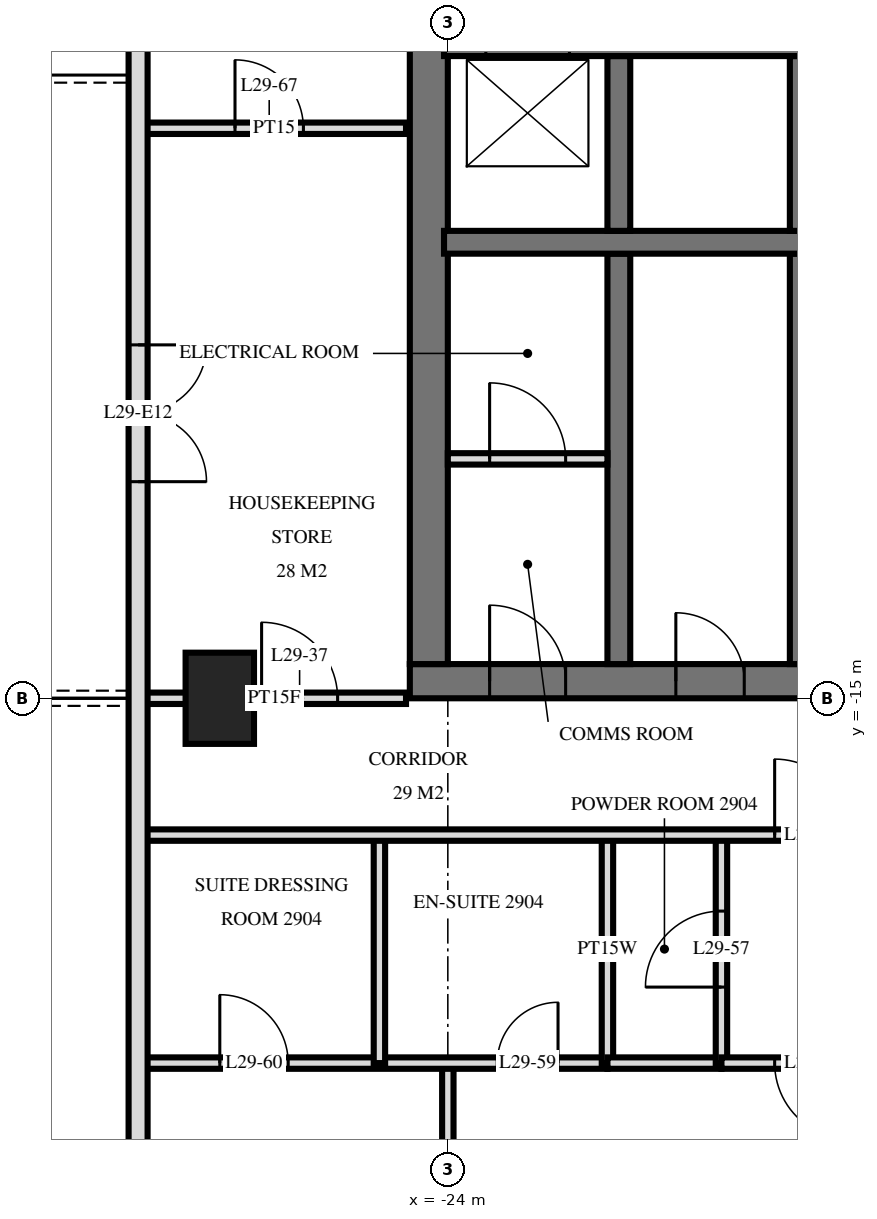
"""IFC4 building model, lengths in metres.
Left out: names, types, materials, properties, quantities, classifications, styles, units other than length and angle.
Written with IfcOpenShell. Run it as: python <this file> out.ifc"""

import sys

from ifc_helpers import new_model, si_unit, direction, frame, frame_2d, origin, origin_2d, place, context, subcontext, project, spatial, rectangle, extrude, element, fill, save


model = new_model("IFC4")
c1 = context("Model", 3, precision=1e-05, world=origin(), true_north=direction((0.0, 1.0)))
c2 = subcontext(c1, "Body", "Model", "MODEL_VIEW")
j1 = project(units=[si_unit("LENGTHUNIT", "METRE"), si_unit("PLANEANGLEUNIT", "RADIAN")], contexts=[c1])
p1 = place(None, origin())
s1 = spatial("IfcSite", under=j1, at=p1, CompositionType="ELEMENT")
p2 = place(p1, origin())
s2 = spatial("IfcBuilding", under=s1, at=p2, CompositionType="ELEMENT")
p3 = place(p2, frame((0.0, 0.0, 116.4)))
s3 = spatial("IfcBuildingStorey", under=s2, at=p3, CompositionType="ELEMENT", Elevation=116.4)
p4 = place(p3, frame((-27.0, -15.0, 0.0), z_axis=(0.0, 0.0, 1.0), x_axis=(0.0, 1.0, 0.0)))
e1 = element("IfcColumn", 1, at=p4, inside=s3, PredefinedType="COLUMN", context=c2, shape_type="SweptSolid", body=[
    extrude(rectangle(XDim=1.2, YDim=0.9, at=origin_2d()), origin(), (0.0, 0.0, 1.0), 3.6),
])
p5 = place(p3, frame((-24.5, -14.775, 0.0), z_axis=(0.0, 0.0, 1.0), x_axis=(1.0, 0.0, 0.0)))
e2 = element("IfcWall", 2, at=p5, inside=s3, PredefinedType="SHEAR", context=c2, shape_type="SweptSolid", body=[
    extrude(rectangle(XDim=14.5, YDim=0.45, at=frame_2d((7.25, 0.0))), origin(), (0.0, 0.0, 1.0), 3.6),
])
p6 = place(p5, frame((6.2, 0.0, 0.0)))
e3 = element("IfcOpeningElement", 3, at=p6, cuts=e2, PredefinedType="OPENING", context=c2, shape_type="SweptSolid", body=[
    extrude(rectangle(XDim=1.2, YDim=2.1, at=frame_2d((0.6, 1.05))), frame((0.0, 0.235, 0.0), z_axis=(0.0, -1.0, 0.0), x_axis=(1.0, 0.0, 0.0)), (0.0, 0.0, 1.0), 0.47),
])
p7 = place(p5, frame((9.25, 0.0, 0.0)))
e4 = element("IfcOpeningElement", 4, at=p7, cuts=e2, PredefinedType="OPENING", context=c2, shape_type="SweptSolid", body=[
    extrude(rectangle(XDim=1.1, YDim=2.1, at=frame_2d((0.55, 1.05))), frame((0.0, 0.235, 0.0), z_axis=(0.0, -1.0, 0.0), x_axis=(1.0, 0.0, 0.0)), (0.0, 0.0, 1.0), 0.47),
])
p8 = place(p5, frame((3.5, 0.0, 0.0)))
e5 = element("IfcOpeningElement", 5, at=p8, cuts=e2, PredefinedType="OPENING", context=c2, shape_type="SweptSolid", body=[
    extrude(rectangle(XDim=0.9, YDim=2.1, at=frame_2d((0.45, 1.05))), frame((0.0, 0.235, 0.0), z_axis=(0.0, -1.0, 0.0), x_axis=(1.0, 0.0, 0.0)), (0.0, 0.0, 1.0), 0.47),
])
p9 = place(p5, frame((1.05, 0.0, 0.0)))
e6 = element("IfcOpeningElement", 6, at=p9, cuts=e2, PredefinedType="OPENING", context=c2, shape_type="SweptSolid", body=[
    extrude(rectangle(XDim=1.0, YDim=2.1, at=frame_2d((0.5, 1.05))), frame((0.0, 0.235, 0.0), z_axis=(0.0, -1.0, 0.0), x_axis=(1.0, 0.0, 0.0)), (0.0, 0.0, 1.0), 0.47),
])
p10 = place(p3, frame((-24.25, -14.55, 0.0), z_axis=(0.0, 0.0, 1.0), x_axis=(0.0, 1.0, 0.0)))
e7 = element("IfcWall", 7, at=p10, inside=s3, PredefinedType="SHEAR", context=c2, shape_type="SweptSolid", body=[
    extrude(rectangle(XDim=14.1, YDim=0.5, at=frame_2d((7.05, 0.0))), origin(), (0.0, 0.0, 1.0), 3.6),
])
p11 = place(p3, frame((-24.05, -6.4, 0.0), z_axis=(0.0, 0.0, 1.0), x_axis=(1.0, 0.0, 0.0)))
e8 = element("IfcWall", 8, at=p11, inside=s3, PredefinedType="SHEAR", context=c2, shape_type="SweptSolid", body=[
    extrude(rectangle(XDim=13.7, YDim=0.3, at=frame_2d((6.85, 0.0))), origin(), (0.0, 0.0, 1.0), 3.6),
])
p12 = place(p11, frame((0.55, 0.0, 0.0)))
e9 = element("IfcOpeningElement", 9, at=p12, cuts=e8, PredefinedType="OPENING", context=c2, shape_type="SweptSolid", body=[
    extrude(rectangle(XDim=1.1, YDim=2.1, at=frame_2d((0.55, 1.05))), frame((0.0, 0.16, 0.0), z_axis=(0.0, -1.0, 0.0), x_axis=(1.0, 0.0, 0.0)), (0.0, 0.0, 1.0), 0.32),
])
p13 = place(p11, frame((5.8, 0.0, 0.0)))
e10 = element("IfcOpeningElement", 10, at=p13, cuts=e8, PredefinedType="OPENING", context=c2, shape_type="SweptSolid", body=[
    extrude(rectangle(XDim=1.1, YDim=2.1, at=frame_2d((0.55, 1.05))), frame((0.0, 0.16, 0.0), z_axis=(0.0, -1.0, 0.0), x_axis=(1.0, 0.0, 0.0)), (0.0, 0.0, 1.0), 0.32),
])
p14 = place(p3, frame((-24.05, -9.0, 0.0), z_axis=(0.0, 0.0, 1.0), x_axis=(1.0, 0.0, 0.0)))
e11 = element("IfcWall", 11, at=p14, inside=s3, PredefinedType="SHEAR", context=c2, shape_type="SweptSolid", body=[
    extrude(rectangle(XDim=13.7, YDim=0.3, at=frame_2d((6.85, 0.0))), origin(), (0.0, 0.0, 1.0), 3.6),
])
p15 = place(p14, frame((8.8, 0.0, 0.0)))
e12 = element("IfcOpeningElement", 12, at=p15, cuts=e11, PredefinedType="OPENING", context=c2, shape_type="SweptSolid", body=[
    extrude(rectangle(XDim=1.1, YDim=2.1, at=frame_2d((0.55, 1.05))), frame((0.0, 0.16, 0.0), z_axis=(0.0, -1.0, 0.0), x_axis=(1.0, 0.0, 0.0)), (0.0, 0.0, 1.0), 0.32),
])
p16 = place(p3, frame((-19.275, -8.85, 0.0), z_axis=(0.0, 0.0, 1.0), x_axis=(0.0, 1.0, 0.0)))
e13 = element("IfcWall", 13, at=p16, inside=s3, PredefinedType="SHEAR", context=c2, shape_type="SweptSolid", body=[
    extrude(rectangle(XDim=2.3, YDim=0.45, at=frame_2d((1.15, 0.0))), origin(), (0.0, 0.0, 1.0), 3.6),
])
p17 = place(p3, frame((-19.275, -14.55, 0.0), z_axis=(0.0, 0.0, 1.0), x_axis=(0.0, 1.0, 0.0)))
e14 = element("IfcWall", 14, at=p17, inside=s3, PredefinedType="SHEAR", context=c2, shape_type="SweptSolid", body=[
    extrude(rectangle(XDim=5.4, YDim=0.45, at=frame_2d((2.7, 0.0))), origin(), (0.0, 0.0, 1.0), 3.6),
])
p18 = place(p3, frame((-21.75, -8.85, 0.0), z_axis=(0.0, 0.0, 1.0), x_axis=(0.0, 1.0, 0.0)))
e15 = element("IfcWall", 15, at=p18, inside=s3, PredefinedType="SHEAR", context=c2, shape_type="SweptSolid", body=[
    extrude(rectangle(XDim=2.3, YDim=0.3, at=frame_2d((1.15, 0.0))), origin(), (0.0, 0.0, 1.0), 3.6),
])
p19 = place(p3, frame((-21.75, -14.55, 0.0), z_axis=(0.0, 0.0, 1.0), x_axis=(0.0, 1.0, 0.0)))
e16 = element("IfcWall", 16, at=p19, inside=s3, PredefinedType="SHEAR", context=c2, shape_type="SweptSolid", body=[
    extrude(rectangle(XDim=5.4, YDim=0.3, at=frame_2d((2.7, 0.0))), origin(), (0.0, 0.0, 1.0), 3.6),
])
p20 = place(p3, frame((-28.075, -3.325, 0.0), z_axis=(0.0, 0.0, 1.0), x_axis=(0.0, -1.0, 0.0)))
e17 = element("IfcWall", 17, at=p20, inside=s3, PredefinedType="SOLIDWALL", context=c2, shape_type="SweptSolid", body=[
    extrude(rectangle(XDim=25.951, YDim=0.25, at=frame_2d((12.975, 0.0))), origin(), (0.0, 0.0, 1.0), 3.32),
])
p21 = place(p20, frame((7.025, 0.0, 0.0)))
e18 = element("IfcOpeningElement", 18, at=p21, cuts=e17, PredefinedType="OPENING", context=c2, shape_type="SweptSolid", body=[
    extrude(rectangle(XDim=1.8, YDim=2.4, at=frame_2d((0.9, 1.2))), frame((0.0, 0.135, 0.0), z_axis=(0.0, -1.0, 0.0), x_axis=(1.0, 0.0, 0.0)), (0.0, 0.0, 1.0), 0.27),
])
p22 = place(p20, frame((18.175, 0.0, 0.0)))
e19 = element("IfcOpeningElement", 19, at=p22, cuts=e17, PredefinedType="OPENING", context=c2, shape_type="SweptSolid", body=[
    extrude(rectangle(XDim=1.8, YDim=2.4, at=frame_2d((0.9, 1.2))), frame((0.0, 0.135, 0.0), z_axis=(0.0, -1.0, 0.0), x_axis=(1.0, 0.0, 0.0)), (0.0, 0.0, 1.0), 0.27),
])
p23 = place(p20, frame((21.075, 0.0, 0.0)))
e20 = element("IfcOpeningElement", 20, at=p23, cuts=e17, PredefinedType="OPENING", context=c2, shape_type="SweptSolid", body=[
    extrude(rectangle(XDim=1.8, YDim=2.4, at=frame_2d((0.9, 1.2))), frame((0.0, 0.135, 0.0), z_axis=(0.0, -1.0, 0.0), x_axis=(1.0, 0.0, 0.0)), (0.0, 0.0, 1.0), 0.27),
])
p24 = place(p20, frame((23.825, 0.0, 0.3)))
e21 = element("IfcOpeningElement", 21, at=p24, cuts=e17, PredefinedType="OPENING", context=c2, shape_type="SweptSolid", body=[
    extrude(rectangle(XDim=1.8, YDim=2.1, at=frame_2d((0.9, 1.05))), frame((0.0, 0.135, 0.0), z_axis=(0.0, -1.0, 0.0), x_axis=(1.0, 0.0, 0.0)), (0.0, 0.0, 1.0), 0.27),
])
p25 = place(p3, frame((-24.0, -11.85, 0.0), z_axis=(0.0, 0.0, 1.0), x_axis=(1.0, 0.0, 0.0)))
e22 = element("IfcWall", 22, at=p25, inside=s3, PredefinedType="PARTITIONING", context=c2, shape_type="SweptSolid", body=[
    extrude(rectangle(XDim=2.1, YDim=0.15, at=frame_2d((1.05, 0.0))), origin(), (0.0, 0.0, 1.0), 3.3),
])
p26 = place(p25, frame((0.55, 0.0, 0.0)))
e23 = element("IfcOpeningElement", 23, at=p26, cuts=e22, PredefinedType="OPENING", context=c2, shape_type="SweptSolid", body=[
    extrude(rectangle(XDim=1.0, YDim=2.1, at=frame_2d((0.5, 1.05))), frame((0.0, 0.085, 0.0), z_axis=(0.0, -1.0, 0.0), x_axis=(1.0, 0.0, 0.0)), (0.0, 0.0, 1.0), 0.17),
])
p27 = place(p3, frame((-20.4, -19.8, 0.0), z_axis=(0.0, 0.0, 1.0), x_axis=(0.0, 1.0, 0.0)))
e24 = element("IfcWall", 24, at=p27, inside=s3, PredefinedType="PARTITIONING", context=c2, shape_type="SweptSolid", body=[
    extrude(rectangle(XDim=3.0, YDim=0.15, at=frame_2d((1.5, 0.0))), origin(), (0.0, 0.0, 1.0), 3.32),
])
p28 = place(p27, frame((1.0, 0.0, 0.0)))
e25 = element("IfcOpeningElement", 25, at=p28, cuts=e24, PredefinedType="OPENING", context=c2, shape_type="SweptSolid", body=[
    extrude(rectangle(XDim=1.0, YDim=2.1, at=frame_2d((0.5, 1.05))), frame((0.0, 0.085, 0.0), z_axis=(0.0, -1.0, 0.0), x_axis=(1.0, 0.0, 0.0)), (0.0, 0.0, 1.0), 0.17),
])
p29 = place(p3, frame((-21.9, -19.8, 0.0), z_axis=(0.0, 0.0, 1.0), x_axis=(0.0, 1.0, 0.0)))
e26 = element("IfcWall", 26, at=p29, inside=s3, PredefinedType="PLUMBINGWALL", context=c2, shape_type="SweptSolid", body=[
    extrude(rectangle(XDim=3.0, YDim=0.15, at=frame_2d((1.5, 0.0))), origin(), (0.0, 0.0, 1.0), 3.32),
])
p30 = place(p3, frame((-24.0, -33.557, 0.0), z_axis=(0.0, 0.0, 1.0), x_axis=(0.0, 1.0, 0.0)))
e27 = element("IfcWall", 27, at=p30, inside=s3, PredefinedType="PARTITIONING", context=c2, shape_type="SweptSolid", body=[
    extrude(rectangle(XDim=13.757, YDim=0.15, at=frame_2d((6.878, 0.0))), origin(), (0.0, 0.0, 1.0), 3.32),
])
p31 = place(p30, frame((6.337, 0.0, 0.0)))
e28 = element("IfcOpeningElement", 28, at=p31, cuts=e27, PredefinedType="OPENING", context=c2, shape_type="SweptSolid", body=[
    extrude(rectangle(XDim=0.9, YDim=2.1, at=frame_2d((0.45, 1.05))), frame((0.0, 0.085, 0.0), z_axis=(0.0, -1.0, 0.0), x_axis=(1.0, 0.0, 0.0)), (0.0, 0.0, 1.0), 0.17),
])
p32 = place(p3, frame((-24.9, -19.8, 0.0), z_axis=(0.0, 0.0, 1.0), x_axis=(0.0, 1.0, 0.0)))
e29 = element("IfcWall", 29, at=p32, inside=s3, PredefinedType="PARTITIONING", context=c2, shape_type="SweptSolid", body=[
    extrude(rectangle(XDim=3.0, YDim=0.15, at=frame_2d((1.5, 0.0))), origin(), (0.0, 0.0, 1.0), 3.32),
])
p33 = place(p3, frame((-20.4, -19.8, 0.0), z_axis=(0.0, 0.0, 1.0), x_axis=(1.0, 0.0, 0.0)))
e30 = element("IfcWall", 30, at=p33, inside=s3, PredefinedType="PARTITIONING", context=c2, shape_type="SweptSolid", body=[
    extrude(rectangle(XDim=2.4, YDim=0.15, at=frame_2d((1.2, 0.0))), origin(), (0.0, 0.0, 1.0), 3.32),
])
p34 = place(p33, frame((0.7, 0.0, 0.0)))
e31 = element("IfcOpeningElement", 31, at=p34, cuts=e30, PredefinedType="OPENING", context=c2, shape_type="SweptSolid", body=[
    extrude(rectangle(XDim=1.0, YDim=2.1, at=frame_2d((0.5, 1.05))), frame((0.0, 0.085, 0.0), z_axis=(0.0, -1.0, 0.0), x_axis=(1.0, 0.0, 0.0)), (0.0, 0.0, 1.0), 0.17),
])
p35 = place(p3, frame((-28.02, -19.8, 0.0), z_axis=(0.0, 0.0, 1.0), x_axis=(1.0, 0.0, 0.0)))
e32 = element("IfcWall", 32, at=p35, inside=s3, PredefinedType="PARTITIONING", context=c2, shape_type="SweptSolid", body=[
    extrude(rectangle(XDim=6.12, YDim=0.15, at=frame_2d((3.06, 0.0))), origin(), (0.0, 0.0, 1.0), 3.32),
])
p36 = place(p35, frame((4.67, 0.0, 0.0)))
e33 = element("IfcOpeningElement", 33, at=p36, cuts=e32, PredefinedType="OPENING", context=c2, shape_type="SweptSolid", body=[
    extrude(rectangle(XDim=0.8, YDim=2.1, at=frame_2d((0.4, 1.05))), frame((0.0, 0.085, 0.0), z_axis=(0.0, -1.0, 0.0), x_axis=(1.0, 0.0, 0.0)), (0.0, 0.0, 1.0), 0.17),
])
p37 = place(p35, frame((1.02, 0.0, 0.0)))
e34 = element("IfcOpeningElement", 34, at=p37, cuts=e32, PredefinedType="OPENING", context=c2, shape_type="SweptSolid", body=[
    extrude(rectangle(XDim=0.9, YDim=2.1, at=frame_2d((0.45, 1.05))), frame((0.0, 0.085, 0.0), z_axis=(0.0, -1.0, 0.0), x_axis=(1.0, 0.0, 0.0)), (0.0, 0.0, 1.0), 0.17),
])
p38 = place(p3, frame((-21.9, -19.8, 0.0), z_axis=(0.0, 0.0, 1.0), x_axis=(1.0, 0.0, 0.0)))
e35 = element("IfcWall", 35, at=p38, inside=s3, PredefinedType="PLUMBINGWALL", context=c2, shape_type="SweptSolid", body=[
    extrude(rectangle(XDim=1.5, YDim=0.15, at=frame_2d((0.75, 0.0))), origin(), (0.0, 0.0, 1.0), 3.32),
])
p39 = place(p3, frame((-28.02, -16.8, 0.0), z_axis=(0.0, 0.0, 1.0), x_axis=(1.0, 0.0, 0.0)))
e36 = element("IfcWall", 36, at=p39, inside=s3, PredefinedType="PARTITIONING", context=c2, shape_type="SweptSolid", body=[
    extrude(rectangle(XDim=56.04, YDim=0.15, at=frame_2d((28.02, 0.0))), origin(), (0.0, 0.0, 1.0), 3.32),
])
p40 = place(p39, frame((13.17, 0.0, 0.0)))
e37 = element("IfcOpeningElement", 37, at=p40, cuts=e36, PredefinedType="OPENING", context=c2, shape_type="SweptSolid", body=[
    extrude(rectangle(XDim=1.0, YDim=2.1, at=frame_2d((0.5, 1.05))), frame((0.0, 0.085, 0.0), z_axis=(0.0, -1.0, 0.0), x_axis=(1.0, 0.0, 0.0)), (0.0, 0.0, 1.0), 0.17),
])
p41 = place(p39, frame((11.87, 0.0, 0.0)))
e38 = element("IfcOpeningElement", 38, at=p41, cuts=e36, PredefinedType="OPENING", context=c2, shape_type="SweptSolid", body=[
    extrude(rectangle(XDim=1.0, YDim=2.1, at=frame_2d((0.5, 1.05))), frame((0.0, 0.085, 0.0), z_axis=(0.0, -1.0, 0.0), x_axis=(1.0, 0.0, 0.0)), (0.0, 0.0, 1.0), 0.17),
])
p42 = place(p39, frame((8.32, 0.0, 0.0)))
e39 = element("IfcOpeningElement", 39, at=p42, cuts=e36, PredefinedType="OPENING", context=c2, shape_type="SweptSolid", body=[
    extrude(rectangle(XDim=1.0, YDim=2.1, at=frame_2d((0.5, 1.05))), frame((0.0, 0.085, 0.0), z_axis=(0.0, -1.0, 0.0), x_axis=(1.0, 0.0, 0.0)), (0.0, 0.0, 1.0), 0.17),
])
p43 = place(p39, frame((40.42, 0.0, 0.0)))
e40 = element("IfcOpeningElement", 40, at=p43, cuts=e36, PredefinedType="OPENING", context=c2, shape_type="SweptSolid", body=[
    extrude(rectangle(XDim=1.0, YDim=2.1, at=frame_2d((0.5, 1.05))), frame((0.0, 0.085, 0.0), z_axis=(0.0, -1.0, 0.0), x_axis=(1.0, 0.0, 0.0)), (0.0, 0.0, 1.0), 0.17),
])
p44 = place(p39, frame((46.72, 0.0, 0.0)))
e41 = element("IfcOpeningElement", 41, at=p44, cuts=e36, PredefinedType="OPENING", context=c2, shape_type="SweptSolid", body=[
    extrude(rectangle(XDim=1.0, YDim=2.1, at=frame_2d((0.5, 1.05))), frame((0.0, 0.085, 0.0), z_axis=(0.0, -1.0, 0.0), x_axis=(1.0, 0.0, 0.0)), (0.0, 0.0, 1.0), 0.17),
])
p45 = place(p39, frame((21.52, 0.0, 0.0)))
e42 = element("IfcOpeningElement", 42, at=p45, cuts=e36, PredefinedType="OPENING", context=c2, shape_type="SweptSolid", body=[
    extrude(rectangle(XDim=1.0, YDim=2.1, at=frame_2d((0.5, 1.05))), frame((0.0, 0.085, 0.0), z_axis=(0.0, -1.0, 0.0), x_axis=(1.0, 0.0, 0.0)), (0.0, 0.0, 1.0), 0.17),
])
p46 = place(p39, frame((30.52, 0.0, 0.0)))
e43 = element("IfcOpeningElement", 43, at=p46, cuts=e36, PredefinedType="OPENING", context=c2, shape_type="SweptSolid", body=[
    extrude(rectangle(XDim=1.0, YDim=2.1, at=frame_2d((0.5, 1.05))), frame((0.0, 0.085, 0.0), z_axis=(0.0, -1.0, 0.0), x_axis=(1.0, 0.0, 0.0)), (0.0, 0.0, 1.0), 0.17),
])
p47 = place(p39, frame((36.52, 0.0, 0.0)))
e44 = element("IfcOpeningElement", 44, at=p47, cuts=e36, PredefinedType="OPENING", context=c2, shape_type="SweptSolid", body=[
    extrude(rectangle(XDim=1.0, YDim=2.1, at=frame_2d((0.5, 1.05))), frame((0.0, 0.085, 0.0), z_axis=(0.0, -1.0, 0.0), x_axis=(1.0, 0.0, 0.0)), (0.0, 0.0, 1.0), 0.17),
])
p48 = place(p3, frame((-28.02, -15.0, 0.0), z_axis=(0.0, 0.0, 1.0), x_axis=(1.0, 0.0, 0.0)))
e45 = element("IfcWall", 45, at=p48, inside=s3, PredefinedType="PARTITIONING", context=c2, shape_type="SweptSolid", body=[
    extrude(rectangle(XDim=3.47, YDim=0.15, at=frame_2d((1.735, 0.0))), origin(), (0.0, 0.0, 1.0), 3.32),
])
p49 = place(p48, frame((1.57, 0.0, 0.0)))
e46 = element("IfcOpeningElement", 46, at=p49, cuts=e45, PredefinedType="OPENING", context=c2, shape_type="SweptSolid", body=[
    extrude(rectangle(XDim=1.0, YDim=2.1, at=frame_2d((0.5, 1.05))), frame((0.0, 0.085, 0.0), z_axis=(0.0, -1.0, 0.0), x_axis=(1.0, 0.0, 0.0)), (0.0, 0.0, 1.0), 0.17),
])
p50 = place(p3, frame((-28.02, -7.5, 0.0), z_axis=(0.0, 0.0, 1.0), x_axis=(1.0, 0.0, 0.0)))
e47 = element("IfcWall", 47, at=p50, inside=s3, PredefinedType="PARTITIONING", context=c2, shape_type="SweptSolid", body=[
    extrude(rectangle(XDim=3.47, YDim=0.15, at=frame_2d((1.735, 0.0))), origin(), (0.0, 0.0, 1.0), 3.32),
])
p51 = place(p50, frame((1.22, 0.0, 0.0)))
e48 = element("IfcOpeningElement", 48, at=p51, cuts=e47, PredefinedType="OPENING", context=c2, shape_type="SweptSolid", body=[
    extrude(rectangle(XDim=0.9, YDim=2.1, at=frame_2d((0.45, 1.05))), frame((0.0, 0.085, 0.0), z_axis=(0.0, -1.0, 0.0), x_axis=(1.0, 0.0, 0.0)), (0.0, 0.0, 1.0), 0.17),
])
p52 = place(p21, origin())
e49 = element("IfcDoor", 49, at=p52, inside=s3, OperationType="DOUBLE_DOOR_SINGLE_SWING", PredefinedType="DOOR", context=c2, shape_type="SweptSolid", body=[
    extrude(rectangle(XDim=1.8, YDim=2.4, at=frame_2d((0.9, 1.2))), frame((0.0, 0.025, 0.0), z_axis=(0.0, -1.0, 0.0), x_axis=(1.0, 0.0, 0.0)), (0.0, 0.0, 1.0), 0.05),
])
fill(e18, e49)
p53 = place(p8, origin())
e50 = element("IfcDoor", 50, at=p53, inside=s3, OperationType="SINGLE_SWING_RIGHT", PredefinedType="DOOR", context=c2, shape_type="SweptSolid", body=[
    extrude(rectangle(XDim=0.9, YDim=2.1, at=frame_2d((0.45, 1.05))), frame((0.0, 0.025, 0.0), z_axis=(0.0, -1.0, 0.0), x_axis=(1.0, 0.0, 0.0)), (0.0, 0.0, 1.0), 0.05),
])
fill(e5, e50)
p54 = place(p9, origin())
e51 = element("IfcDoor", 51, at=p54, inside=s3, OperationType="SINGLE_SWING_RIGHT", PredefinedType="DOOR", context=c2, shape_type="SweptSolid", body=[
    extrude(rectangle(XDim=1.0, YDim=2.1, at=frame_2d((0.5, 1.05))), frame((0.0, 0.025, 0.0), z_axis=(0.0, -1.0, 0.0), x_axis=(1.0, 0.0, 0.0)), (0.0, 0.0, 1.0), 0.05),
])
fill(e6, e51)
p55 = place(p26, origin())
e52 = element("IfcDoor", 52, at=p55, inside=s3, OperationType="SINGLE_SWING_RIGHT", PredefinedType="DOOR", context=c2, shape_type="SweptSolid", body=[
    extrude(rectangle(XDim=1.0, YDim=2.1, at=frame_2d((0.5, 1.05))), frame((0.0, 0.025, 0.0), z_axis=(0.0, -1.0, 0.0), x_axis=(1.0, 0.0, 0.0)), (0.0, 0.0, 1.0), 0.05),
])
fill(e23, e52)
p56 = place(p42, origin())
e53 = element("IfcDoor", 53, at=p56, inside=s3, OperationType="SINGLE_SWING_RIGHT", PredefinedType="DOOR", context=c2, shape_type="SweptSolid", body=[
    extrude(rectangle(XDim=1.0, YDim=2.1, at=frame_2d((0.5, 1.05))), frame((0.0, 0.025, 0.0), z_axis=(0.0, -1.0, 0.0), x_axis=(1.0, 0.0, 0.0)), (0.0, 0.0, 1.0), 0.05),
])
fill(e39, e53)
p57 = place(p49, origin())
e54 = element("IfcDoor", 54, at=p57, inside=s3, OperationType="SINGLE_SWING_RIGHT", PredefinedType="DOOR", context=c2, shape_type="SweptSolid", body=[
    extrude(rectangle(XDim=1.0, YDim=2.1, at=frame_2d((0.5, 1.05))), frame((0.0, 0.025, 0.0), z_axis=(0.0, -1.0, 0.0), x_axis=(1.0, 0.0, 0.0)), (0.0, 0.0, 1.0), 0.05),
])
fill(e46, e54)
p58 = place(p28, origin())
e55 = element("IfcDoor", 55, at=p58, inside=s3, OperationType="SINGLE_SWING_RIGHT", PredefinedType="DOOR", context=c2, shape_type="SweptSolid", body=[
    extrude(rectangle(XDim=1.0, YDim=2.1, at=frame_2d((0.5, 1.05))), frame((0.0, 0.025, 0.0), z_axis=(0.0, -1.0, 0.0), x_axis=(1.0, 0.0, 0.0)), (0.0, 0.0, 1.0), 0.05),
])
fill(e25, e55)
p59 = place(p34, frame((0.5, 0.0, 0.0), z_axis=(0.0, 0.0, 1.0), x_axis=(-1.0, 0.0, 0.0)))
e56 = element("IfcDoor", 56, at=p59, inside=s3, OperationType="SINGLE_SWING_RIGHT", PredefinedType="DOOR", context=c2, shape_type="SweptSolid", body=[
    extrude(rectangle(XDim=1.0, YDim=2.1, at=frame_2d((0.0, 1.05))), frame((0.0, -0.025, 0.0), z_axis=(0.0, 1.0, 0.0), x_axis=(-1.0, 0.0, 0.0)), (0.0, 0.0, 1.0), 0.05),
])
fill(e31, e56)
p60 = place(p36, origin())
e57 = element("IfcDoor", 57, at=p60, inside=s3, OperationType="SINGLE_SWING_LEFT", PredefinedType="DOOR", context=c2, shape_type="SweptSolid", body=[
    extrude(rectangle(XDim=0.8, YDim=2.1, at=frame_2d((0.4, 1.05))), frame((0.0, 0.025, 0.0), z_axis=(0.0, -1.0, 0.0), x_axis=(1.0, 0.0, 0.0)), (0.0, 0.0, 1.0), 0.05),
])
fill(e33, e57)
p61 = place(p37, origin())
e58 = element("IfcDoor", 58, at=p61, inside=s3, OperationType="SINGLE_SWING_RIGHT", PredefinedType="DOOR", context=c2, shape_type="SweptSolid", body=[
    extrude(rectangle(XDim=0.9, YDim=2.1, at=frame_2d((0.45, 1.05))), frame((0.0, 0.025, 0.0), z_axis=(0.0, -1.0, 0.0), x_axis=(1.0, 0.0, 0.0)), (0.0, 0.0, 1.0), 0.05),
])
fill(e34, e58)
p62 = place(p51, origin())
e59 = element("IfcDoor", 59, at=p62, inside=s3, OperationType="SINGLE_SWING_RIGHT", PredefinedType="DOOR", context=c2, shape_type="SweptSolid", body=[
    extrude(rectangle(XDim=0.9, YDim=2.1, at=frame_2d((0.45, 1.05))), frame((0.0, 0.025, 0.0), z_axis=(0.0, -1.0, 0.0), x_axis=(1.0, 0.0, 0.0)), (0.0, 0.0, 1.0), 0.05),
])
fill(e48, e59)
save(model, sys.argv[1])
